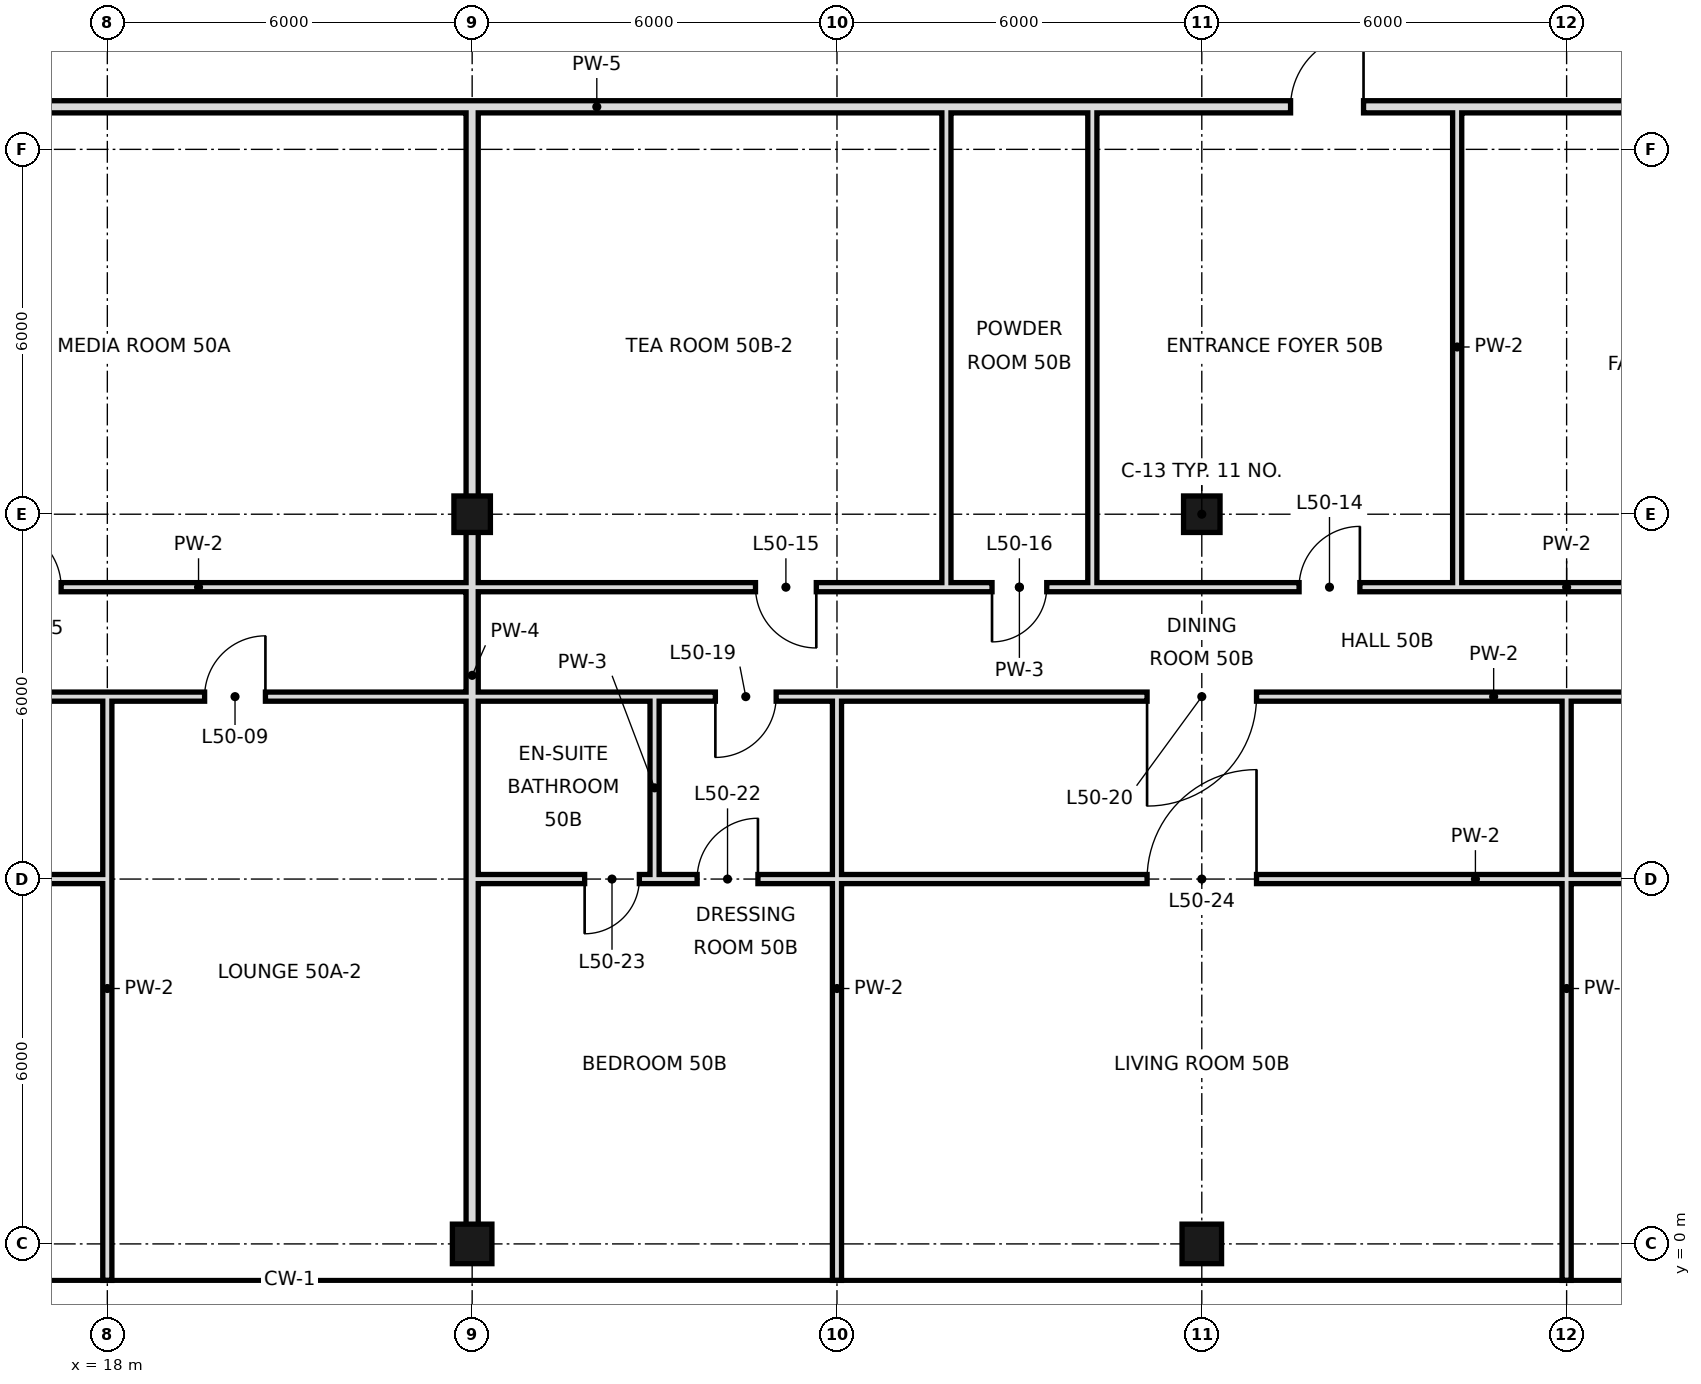
"""IFC4 building model, lengths in metres.
Left out: names, types, materials, properties, quantities, classifications, styles, units other than length and angle.
Written with IfcOpenShell. Run it as: python <this file> out.ifc"""

import sys

from ifc_helpers import new_model, si_unit, direction, frame, frame_2d, origin, origin_2d, place, context, subcontext, project, spatial, rectangle, hollow_rectangle, extrude, element, fill, save


model = new_model("IFC4")
c1 = context("Model", 3, precision=1e-05, world=origin(), true_north=direction((0.0, 1.0)))
c2 = subcontext(c1, "Body", "Model", "MODEL_VIEW")
j1 = project(units=[si_unit("LENGTHUNIT", "METRE"), si_unit("PLANEANGLEUNIT", "RADIAN")], contexts=[c1])
p1 = place(None, origin())
s1 = spatial("IfcSite", under=j1, at=p1, CompositionType="ELEMENT")
p2 = place(p1, origin())
s2 = spatial("IfcBuilding", under=s1, at=p2, CompositionType="ELEMENT")
p3 = place(p2, frame((0.0, 0.0, 215.4)))
s3 = spatial("IfcBuildingStorey", under=s2, at=p3, CompositionType="ELEMENT", Elevation=215.4)
p4 = place(p3, frame((24.0, 0.0, 0.0), z_axis=(0.0, 0.0, 1.0), x_axis=(1.0, 0.0, 0.0)))
e1 = element("IfcColumn", 1, at=p4, inside=s3, PredefinedType="COLUMN", context=c2, shape_type="SweptSolid", body=[
    extrude(hollow_rectangle(XDim=0.65, YDim=0.65, WallThickness=0.032, at=origin_2d()), origin(), (0.0, 0.0, 1.0), 3.6),
])
p5 = place(p3, frame((24.0, 12.0, 0.0), z_axis=(0.0, 0.0, 1.0), x_axis=(1.0, 0.0, 0.0)))
e2 = element("IfcColumn", 2, at=p5, inside=s3, PredefinedType="COLUMN", context=c2, shape_type="SweptSolid", body=[
    extrude(hollow_rectangle(XDim=0.6, YDim=0.6, WallThickness=0.028, at=origin_2d()), origin(), (0.0, 0.0, 1.0), 3.6),
])
p6 = place(p3, frame((36.0, 0.0, 0.0), z_axis=(0.0, 0.0, 1.0), x_axis=(1.0, 0.0, 0.0)))
e3 = element("IfcColumn", 3, at=p6, inside=s3, PredefinedType="COLUMN", context=c2, shape_type="SweptSolid", body=[
    extrude(hollow_rectangle(XDim=0.65, YDim=0.65, WallThickness=0.032, at=origin_2d()), origin(), (0.0, 0.0, 1.0), 3.6),
])
p7 = place(p3, frame((36.0, 12.0, 0.0), z_axis=(0.0, 0.0, 1.0), x_axis=(1.0, 0.0, 0.0)))
e4 = element("IfcColumn", 4, at=p7, inside=s3, PredefinedType="COLUMN", context=c2, shape_type="SweptSolid", body=[
    extrude(hollow_rectangle(XDim=0.6, YDim=0.6, WallThickness=0.028, at=origin_2d()), origin(), (0.0, 0.0, 1.0), 3.6),
])
p8 = place(p3, frame((18.0, -0.6, 0.0), z_axis=(0.0, 0.0, 1.0), x_axis=(0.0, 1.0, 0.0)))
e5 = element("IfcWall", 5, at=p8, inside=s3, PredefinedType="PARTITIONING", context=c2, shape_type="SweptSolid", body=[
    extrude(rectangle(XDim=9.6, YDim=0.15, at=frame_2d((4.8, 0.0))), origin(), (0.0, 0.0, 1.0), 2.72),
])
p9 = place(p3, frame((24.0, 0.0, 0.0), z_axis=(0.0, 0.0, 1.0), x_axis=(0.0, 1.0, 0.0)))
e6 = element("IfcWall", 6, at=p9, inside=s3, PredefinedType="SOLIDWALL", context=c2, shape_type="SweptSolid", body=[
    extrude(rectangle(XDim=18.7, YDim=0.2, at=frame_2d((9.35, 0.0))), origin(), (0.0, 0.0, 1.0), 2.72),
])
p10 = place(p3, frame((27.0, 6.0, 0.0), z_axis=(0.0, 0.0, 1.0), x_axis=(0.0, 1.0, 0.0)))
e7 = element("IfcWall", 7, at=p10, inside=s3, PredefinedType="PARTITIONING", context=c2, shape_type="SweptSolid", body=[
    extrude(rectangle(XDim=3.0, YDim=0.15, at=frame_2d((1.5, 0.0))), origin(), (0.0, 0.0, 1.0), 3.42),
])
p11 = place(p3, frame((30.0, -0.6, 0.0), z_axis=(0.0, 0.0, 1.0), x_axis=(0.0, 1.0, 0.0)))
e8 = element("IfcWall", 8, at=p11, inside=s3, PredefinedType="PARTITIONING", context=c2, shape_type="SweptSolid", body=[
    extrude(rectangle(XDim=9.6, YDim=0.15, at=frame_2d((4.8, 0.0))), origin(), (0.0, 0.0, 1.0), 2.72),
])
for number, where, z_axis, x_axis in (
    (9, (31.8, 10.8, 0.0), (0.0, 0.0, 1.0), (0.0, 1.0, 0.0)),
    (10, (34.2, 10.8, 0.0), (0.0, 0.0, 1.0), (0.0, 1.0, 0.0)),
    (11, (40.2, 10.8, 0.0), (0.0, 0.0, 1.0), (0.0, 1.0, 0.0)),
):
    element("IfcWall", number, at=place(p3, frame(where, z_axis=z_axis, x_axis=x_axis)), inside=s3, PredefinedType="PARTITIONING", context=c2, shape_type="SweptSolid", body=[
        extrude(rectangle(XDim=7.9, YDim=0.15, at=frame_2d((3.95, 0.0))), origin(), (0.0, 0.0, 1.0), 3.42),
    ])
p12 = place(p3, frame((42.0, -0.6, 0.0), z_axis=(0.0, 0.0, 1.0), x_axis=(0.0, 1.0, 0.0)))
e12 = element("IfcWall", 12, at=p12, inside=s3, PredefinedType="PARTITIONING", context=c2, shape_type="SweptSolid", body=[
    extrude(rectangle(XDim=9.6, YDim=0.15, at=frame_2d((4.8, 0.0))), origin(), (0.0, 0.0, 1.0), 2.72),
])
p13 = place(p3, frame((7.2, 10.8, 0.0), z_axis=(0.0, 0.0, 1.0), x_axis=(1.0, 0.0, 0.0)))
e13 = element("IfcWall", 13, at=p13, inside=s3, PredefinedType="PARTITIONING", context=c2, shape_type="SweptSolid", body=[
    extrude(rectangle(XDim=24.6, YDim=0.15, at=frame_2d((12.3, 0.0))), origin(), (0.0, 0.0, 1.0), 3.42),
])
p14 = place(p13, frame((1.6, 0.0, 0.0)))
e14 = element("IfcOpeningElement", 14, at=p14, cuts=e13, PredefinedType="OPENING", context=c2, shape_type="SweptSolid", body=[
    extrude(rectangle(XDim=1.0, YDim=2.4, at=frame_2d((0.5, 1.2))), frame((0.0, 0.085, 0.0), z_axis=(0.0, -1.0, 0.0), x_axis=(1.0, 0.0, 0.0)), (0.0, 0.0, 1.0), 0.17),
])
p15 = place(p13, frame((9.04, 0.0, 0.0)))
e15 = element("IfcOpeningElement", 15, at=p15, cuts=e13, PredefinedType="OPENING", context=c2, shape_type="SweptSolid", body=[
    extrude(rectangle(XDim=1.0, YDim=2.4, at=frame_2d((0.5, 1.2))), frame((0.0, 0.085, 0.0), z_axis=(0.0, -1.0, 0.0), x_axis=(1.0, 0.0, 0.0)), (0.0, 0.0, 1.0), 0.17),
])
p16 = place(p13, frame((21.46, 0.0, 0.0)))
e16 = element("IfcOpeningElement", 16, at=p16, cuts=e13, PredefinedType="OPENING", context=c2, shape_type="SweptSolid", body=[
    extrude(rectangle(XDim=1.0, YDim=2.4, at=frame_2d((0.5, 1.2))), frame((0.0, 0.085, 0.0), z_axis=(0.0, -1.0, 0.0), x_axis=(1.0, 0.0, 0.0)), (0.0, 0.0, 1.0), 0.17),
])
p17 = place(p3, frame((34.2, 10.8, 0.0), z_axis=(0.0, 0.0, 1.0), x_axis=(1.0, 0.0, 0.0)))
e17 = element("IfcWall", 17, at=p17, inside=s3, PredefinedType="PARTITIONING", context=c2, shape_type="SweptSolid", body=[
    extrude(rectangle(XDim=15.6, YDim=0.15, at=frame_2d((7.8, 0.0))), origin(), (0.0, 0.0, 1.0), 3.42),
])
p18 = place(p17, frame((3.4, 0.0, 0.0)))
e18 = element("IfcOpeningElement", 18, at=p18, cuts=e17, PredefinedType="OPENING", context=c2, shape_type="SweptSolid", body=[
    extrude(rectangle(XDim=1.0, YDim=2.4, at=frame_2d((0.5, 1.2))), frame((0.0, 0.085, 0.0), z_axis=(0.0, -1.0, 0.0), x_axis=(1.0, 0.0, 0.0)), (0.0, 0.0, 1.0), 0.17),
])
p19 = place(p17, frame((11.92, 0.0, 0.0)))
e19 = element("IfcOpeningElement", 19, at=p19, cuts=e17, PredefinedType="OPENING", context=c2, shape_type="SweptSolid", body=[
    extrude(rectangle(XDim=1.0, YDim=2.4, at=frame_2d((0.5, 1.2))), frame((0.0, 0.085, 0.0), z_axis=(0.0, -1.0, 0.0), x_axis=(1.0, 0.0, 0.0)), (0.0, 0.0, 1.0), 0.17),
])
p20 = place(p3, frame((31.8, 10.8, 0.0), z_axis=(0.0, 0.0, 1.0), x_axis=(1.0, 0.0, 0.0)))
e20 = element("IfcWall", 20, at=p20, inside=s3, PredefinedType="PARTITIONING", context=c2, shape_type="SweptSolid", body=[
    extrude(rectangle(XDim=2.4, YDim=0.15, at=frame_2d((1.2, 0.0))), origin(), (0.0, 0.0, 1.0), 3.42),
])
p21 = place(p20, frame((0.75, 0.0, 0.0)))
e21 = element("IfcOpeningElement", 21, at=p21, cuts=e20, PredefinedType="OPENING", context=c2, shape_type="SweptSolid", body=[
    extrude(rectangle(XDim=0.9, YDim=2.4, at=frame_2d((0.45, 1.2))), frame((0.0, 0.085, 0.0), z_axis=(0.0, -1.0, 0.0), x_axis=(1.0, 0.0, 0.0)), (0.0, 0.0, 1.0), 0.17),
])
p22 = place(p3, frame((7.2, 18.7, 0.0), z_axis=(0.0, 0.0, 1.0), x_axis=(1.0, 0.0, 0.0)))
e22 = element("IfcWall", 22, at=p22, inside=s3, PredefinedType="SOLIDWALL", context=c2, shape_type="SweptSolid", body=[
    extrude(rectangle(XDim=37.7, YDim=0.2, at=frame_2d((18.85, 0.0))), origin(), (0.0, 0.0, 1.0), 2.72),
])
p23 = place(p22, frame((1.54, 0.0, 0.0)))
e23 = element("IfcOpeningElement", 23, at=p23, cuts=e22, PredefinedType="OPENING", context=c2, shape_type="SweptSolid", body=[
    extrude(rectangle(XDim=1.2, YDim=2.4, at=frame_2d((0.6, 1.2))), frame((0.0, 0.11, 0.0), z_axis=(0.0, -1.0, 0.0), x_axis=(1.0, 0.0, 0.0)), (0.0, 0.0, 1.0), 0.22),
])
p24 = place(p22, frame((30.26, 0.0, 0.0)))
e24 = element("IfcOpeningElement", 24, at=p24, cuts=e22, PredefinedType="OPENING", context=c2, shape_type="SweptSolid", body=[
    extrude(rectangle(XDim=1.2, YDim=2.4, at=frame_2d((0.6, 1.2))), frame((0.0, 0.11, 0.0), z_axis=(0.0, -1.0, 0.0), x_axis=(1.0, 0.0, 0.0)), (0.0, 0.0, 1.0), 0.22),
])
p25 = place(p3, frame((6.0, 6.0, 0.0), z_axis=(0.0, 0.0, 1.0), x_axis=(1.0, 0.0, 0.0)))
e25 = element("IfcWall", 25, at=p25, inside=s3, PredefinedType="PARTITIONING", context=c2, shape_type="SweptSolid", body=[
    extrude(rectangle(XDim=12.0, YDim=0.15, at=frame_2d((6.0, 0.0))), origin(), (0.0, 0.0, 1.0), 2.97),
])
p26 = place(p25, frame((3.4, 0.0, 0.0)))
e26 = element("IfcOpeningElement", 26, at=p26, cuts=e25, PredefinedType="OPENING", context=c2, shape_type="SweptSolid", body=[
    extrude(rectangle(XDim=1.0, YDim=2.4, at=frame_2d((0.5, 1.2))), frame((0.0, 0.085, 0.0), z_axis=(0.0, -1.0, 0.0), x_axis=(1.0, 0.0, 0.0)), (0.0, 0.0, 1.0), 0.17),
])
p27 = place(p3, frame((27.0, 6.0, 0.0), z_axis=(0.0, 0.0, 1.0), x_axis=(1.0, 0.0, 0.0)))
e27 = element("IfcWall", 27, at=p27, inside=s3, PredefinedType="PARTITIONING", context=c2, shape_type="SweptSolid", body=[
    extrude(rectangle(XDim=27.0, YDim=0.15, at=frame_2d((13.5, 0.0))), origin(), (0.0, 0.0, 1.0), 2.97),
])
p28 = place(p27, frame((0.7, 0.0, 0.0)))
e28 = element("IfcOpeningElement", 28, at=p28, cuts=e27, PredefinedType="OPENING", context=c2, shape_type="SweptSolid", body=[
    extrude(rectangle(XDim=1.0, YDim=2.4, at=frame_2d((0.5, 1.2))), frame((0.0, 0.085, 0.0), z_axis=(0.0, -1.0, 0.0), x_axis=(1.0, 0.0, 0.0)), (0.0, 0.0, 1.0), 0.17),
])
p29 = place(p27, frame((8.1, 0.0, 0.0)))
e29 = element("IfcOpeningElement", 29, at=p29, cuts=e27, PredefinedType="OPENING", context=c2, shape_type="SweptSolid", body=[
    extrude(rectangle(XDim=1.8, YDim=2.4, at=frame_2d((0.9, 1.2))), frame((0.0, 0.085, 0.0), z_axis=(0.0, -1.0, 0.0), x_axis=(1.0, 0.0, 0.0)), (0.0, 0.0, 1.0), 0.17),
])
p30 = place(p27, frame((20.5, 0.0, 0.0)))
e30 = element("IfcOpeningElement", 30, at=p30, cuts=e27, PredefinedType="OPENING", context=c2, shape_type="SweptSolid", body=[
    extrude(rectangle(XDim=1.0, YDim=2.4, at=frame_2d((0.5, 1.2))), frame((0.0, 0.085, 0.0), z_axis=(0.0, -1.0, 0.0), x_axis=(1.0, 0.0, 0.0)), (0.0, 0.0, 1.0), 0.17),
])
p31 = place(p3, frame((24.0, 6.0, 0.0), z_axis=(0.0, 0.0, 1.0), x_axis=(1.0, 0.0, 0.0)))
e31 = element("IfcWall", 31, at=p31, inside=s3, PredefinedType="PARTITIONING", context=c2, shape_type="SweptSolid", body=[
    extrude(rectangle(XDim=3.0, YDim=0.15, at=frame_2d((1.5, 0.0))), origin(), (0.0, 0.0, 1.0), 2.97),
])
p32 = place(p31, frame((1.85, 0.0, 0.0)))
e32 = element("IfcOpeningElement", 32, at=p32, cuts=e31, PredefinedType="OPENING", context=c2, shape_type="SweptSolid", body=[
    extrude(rectangle(XDim=0.9, YDim=2.4, at=frame_2d((0.45, 1.2))), frame((0.0, 0.085, 0.0), z_axis=(0.0, -1.0, 0.0), x_axis=(1.0, 0.0, 0.0)), (0.0, 0.0, 1.0), 0.17),
])
p33 = place(p3, frame((6.0, 9.0, 0.0), z_axis=(0.0, 0.0, 1.0), x_axis=(1.0, 0.0, 0.0)))
e33 = element("IfcWall", 33, at=p33, inside=s3, PredefinedType="PARTITIONING", context=c2, shape_type="SweptSolid", body=[
    extrude(rectangle(XDim=18.0, YDim=0.15, at=frame_2d((9.0, 0.0))), origin(), (0.0, 0.0, 1.0), 3.42),
])
p34 = place(p33, frame((5.5, 0.0, 0.0)))
e34 = element("IfcOpeningElement", 34, at=p34, cuts=e33, PredefinedType="OPENING", context=c2, shape_type="SweptSolid", body=[
    extrude(rectangle(XDim=1.0, YDim=2.4, at=frame_2d((0.5, 1.2))), frame((0.0, 0.085, 0.0), z_axis=(0.0, -1.0, 0.0), x_axis=(1.0, 0.0, 0.0)), (0.0, 0.0, 1.0), 0.17),
])
p35 = place(p33, frame((13.6, 0.0, 0.0)))
e35 = element("IfcOpeningElement", 35, at=p35, cuts=e33, PredefinedType="OPENING", context=c2, shape_type="SweptSolid", body=[
    extrude(rectangle(XDim=1.0, YDim=2.4, at=frame_2d((0.5, 1.2))), frame((0.0, 0.085, 0.0), z_axis=(0.0, -1.0, 0.0), x_axis=(1.0, 0.0, 0.0)), (0.0, 0.0, 1.0), 0.17),
])
p36 = place(p3, frame((27.0, 9.0, 0.0), z_axis=(0.0, 0.0, 1.0), x_axis=(1.0, 0.0, 0.0)))
e36 = element("IfcWall", 36, at=p36, inside=s3, PredefinedType="PARTITIONING", context=c2, shape_type="SweptSolid", body=[
    extrude(rectangle(XDim=27.6, YDim=0.15, at=frame_2d((13.8, 0.0))), origin(), (0.0, 0.0, 1.0), 3.42),
])
p37 = place(p36, frame((1.0, 0.0, 0.0)))
e37 = element("IfcOpeningElement", 37, at=p37, cuts=e36, PredefinedType="OPENING", context=c2, shape_type="SweptSolid", body=[
    extrude(rectangle(XDim=1.0, YDim=2.4, at=frame_2d((0.5, 1.2))), frame((0.0, 0.085, 0.0), z_axis=(0.0, -1.0, 0.0), x_axis=(1.0, 0.0, 0.0)), (0.0, 0.0, 1.0), 0.17),
])
p38 = place(p36, frame((8.1, 0.0, 0.0)))
e38 = element("IfcOpeningElement", 38, at=p38, cuts=e36, PredefinedType="OPENING", context=c2, shape_type="SweptSolid", body=[
    extrude(rectangle(XDim=1.8, YDim=2.4, at=frame_2d((0.9, 1.2))), frame((0.0, 0.085, 0.0), z_axis=(0.0, -1.0, 0.0), x_axis=(1.0, 0.0, 0.0)), (0.0, 0.0, 1.0), 0.17),
])
p39 = place(p36, frame((20.5, 0.0, 0.0)))
e39 = element("IfcOpeningElement", 39, at=p39, cuts=e36, PredefinedType="OPENING", context=c2, shape_type="SweptSolid", body=[
    extrude(rectangle(XDim=1.0, YDim=2.4, at=frame_2d((0.5, 1.2))), frame((0.0, 0.085, 0.0), z_axis=(0.0, -1.0, 0.0), x_axis=(1.0, 0.0, 0.0)), (0.0, 0.0, 1.0), 0.17),
])
p40 = place(p3, frame((24.0, 9.0, 0.0), z_axis=(0.0, 0.0, 1.0), x_axis=(1.0, 0.0, 0.0)))
e40 = element("IfcWall", 40, at=p40, inside=s3, PredefinedType="PARTITIONING", context=c2, shape_type="SweptSolid", body=[
    extrude(rectangle(XDim=3.0, YDim=0.15, at=frame_2d((1.5, 0.0))), origin(), (0.0, 0.0, 1.0), 3.42),
])
p41 = place(p15, origin())
e41 = element("IfcDoor", 41, at=p41, inside=s3, OperationType="SINGLE_SWING_LEFT", PredefinedType="DOOR", context=c2, shape_type="SweptSolid", body=[
    extrude(rectangle(XDim=1.0, YDim=2.4, at=frame_2d((0.5, 1.2))), frame((0.0, 0.025, 0.0), z_axis=(0.0, -1.0, 0.0), x_axis=(1.0, 0.0, 0.0)), (0.0, 0.0, 1.0), 0.05),
])
fill(e15, e41)
p42 = place(p35, frame((1.0, 0.0, 0.0), z_axis=(0.0, 0.0, 1.0), x_axis=(-1.0, 0.0, 0.0)))
e42 = element("IfcDoor", 42, at=p42, inside=s3, OperationType="SINGLE_SWING_LEFT", PredefinedType="DOOR", context=c2, shape_type="SweptSolid", body=[
    extrude(rectangle(XDim=1.0, YDim=2.4, at=frame_2d((0.5, 1.2))), frame((0.0, 0.025, 0.0), z_axis=(0.0, -1.0, 0.0), x_axis=(1.0, 0.0, 0.0)), (0.0, 0.0, 1.0), 0.05),
])
fill(e35, e42)
p43 = place(p18, frame((1.0, 0.0, 0.0), z_axis=(0.0, 0.0, 1.0), x_axis=(-1.0, 0.0, 0.0)))
e43 = element("IfcDoor", 43, at=p43, inside=s3, OperationType="SINGLE_SWING_LEFT", PredefinedType="DOOR", context=c2, shape_type="SweptSolid", body=[
    extrude(rectangle(XDim=1.0, YDim=2.4, at=frame_2d((0.5, 1.2))), frame((0.0, 0.025, 0.0), z_axis=(0.0, -1.0, 0.0), x_axis=(1.0, 0.0, 0.0)), (0.0, 0.0, 1.0), 0.05),
])
fill(e18, e43)
p44 = place(p16, origin())
e44 = element("IfcDoor", 44, at=p44, inside=s3, OperationType="SINGLE_SWING_RIGHT", PredefinedType="DOOR", context=c2, shape_type="SweptSolid", body=[
    extrude(rectangle(XDim=1.0, YDim=2.4, at=frame_2d((0.5, 1.2))), frame((0.0, 0.025, 0.0), z_axis=(0.0, -1.0, 0.0), x_axis=(1.0, 0.0, 0.0)), (0.0, 0.0, 1.0), 0.05),
])
fill(e16, e44)
p45 = place(p21, frame((0.9, 0.0, 0.0), z_axis=(0.0, 0.0, 1.0), x_axis=(-1.0, 0.0, 0.0)))
e45 = element("IfcDoor", 45, at=p45, inside=s3, OperationType="SINGLE_SWING_RIGHT", PredefinedType="DOOR", context=c2, shape_type="SweptSolid", body=[
    extrude(rectangle(XDim=0.9, YDim=2.4, at=frame_2d((0.45, 1.2))), frame((0.0, 0.025, 0.0), z_axis=(0.0, -1.0, 0.0), x_axis=(1.0, 0.0, 0.0)), (0.0, 0.0, 1.0), 0.05),
])
fill(e21, e45)
p46 = place(p37, frame((1.0, 0.0, 0.0), z_axis=(0.0, 0.0, 1.0), x_axis=(-1.0, 0.0, 0.0)))
e46 = element("IfcDoor", 46, at=p46, inside=s3, OperationType="SINGLE_SWING_RIGHT", PredefinedType="DOOR", context=c2, shape_type="SweptSolid", body=[
    extrude(rectangle(XDim=1.0, YDim=2.4, at=frame_2d((0.5, 1.2))), frame((0.0, 0.025, 0.0), z_axis=(0.0, -1.0, 0.0), x_axis=(1.0, 0.0, 0.0)), (0.0, 0.0, 1.0), 0.05),
])
fill(e37, e46)
p47 = place(p38, frame((1.8, 0.0, 0.0), z_axis=(0.0, 0.0, 1.0), x_axis=(-1.0, 0.0, 0.0)))
e47 = element("IfcDoor", 47, at=p47, inside=s3, OperationType="SINGLE_SWING_RIGHT", PredefinedType="DOOR", context=c2, shape_type="SweptSolid", body=[
    extrude(rectangle(XDim=1.8, YDim=2.4, at=frame_2d((0.9, 1.2))), frame((0.0, 0.025, 0.0), z_axis=(0.0, -1.0, 0.0), x_axis=(1.0, 0.0, 0.0)), (0.0, 0.0, 1.0), 0.05),
])
fill(e38, e47)
p48 = place(p28, frame((1.0, 0.0, 0.0), z_axis=(0.0, 0.0, 1.0), x_axis=(-1.0, 0.0, 0.0)))
e48 = element("IfcDoor", 48, at=p48, inside=s3, OperationType="SINGLE_SWING_LEFT", PredefinedType="DOOR", context=c2, shape_type="SweptSolid", body=[
    extrude(rectangle(XDim=1.0, YDim=2.4, at=frame_2d((0.5, 1.2))), frame((0.0, 0.025, 0.0), z_axis=(0.0, -1.0, 0.0), x_axis=(1.0, 0.0, 0.0)), (0.0, 0.0, 1.0), 0.05),
])
fill(e28, e48)
p49 = place(p32, frame((0.9, 0.0, 0.0), z_axis=(0.0, 0.0, 1.0), x_axis=(-1.0, 0.0, 0.0)))
e49 = element("IfcDoor", 49, at=p49, inside=s3, OperationType="SINGLE_SWING_RIGHT", PredefinedType="DOOR", context=c2, shape_type="SweptSolid", body=[
    extrude(rectangle(XDim=0.9, YDim=2.4, at=frame_2d((0.45, 1.2))), frame((0.0, 0.025, 0.0), z_axis=(0.0, -1.0, 0.0), x_axis=(1.0, 0.0, 0.0)), (0.0, 0.0, 1.0), 0.05),
])
fill(e32, e49)
p50 = place(p29, frame((1.8, 0.0, 0.0), z_axis=(0.0, 0.0, 1.0), x_axis=(-1.0, 0.0, 0.0)))
e50 = element("IfcDoor", 50, at=p50, inside=s3, OperationType="SINGLE_SWING_LEFT", PredefinedType="DOOR", context=c2, shape_type="SweptSolid", body=[
    extrude(rectangle(XDim=1.8, YDim=2.4, at=frame_2d((0.9, 1.2))), frame((0.0, 0.025, 0.0), z_axis=(0.0, -1.0, 0.0), x_axis=(1.0, 0.0, 0.0)), (0.0, 0.0, 1.0), 0.05),
])
fill(e29, e50)
p51 = place(p24, frame((1.2, 0.0, 0.0), z_axis=(0.0, 0.0, 1.0), x_axis=(-1.0, 0.0, 0.0)))
e51 = element("IfcDoor", 51, at=p51, inside=s3, OperationType="SINGLE_SWING_LEFT", PredefinedType="DOOR", context=c2, shape_type="SweptSolid", body=[
    extrude(rectangle(XDim=1.2, YDim=2.4, at=frame_2d((0.6, 1.2))), frame((0.0, 0.025, 0.0), z_axis=(0.0, -1.0, 0.0), x_axis=(1.0, 0.0, 0.0)), (0.0, 0.0, 1.0), 0.05),
])
fill(e24, e51)
save(model, sys.argv[1])
